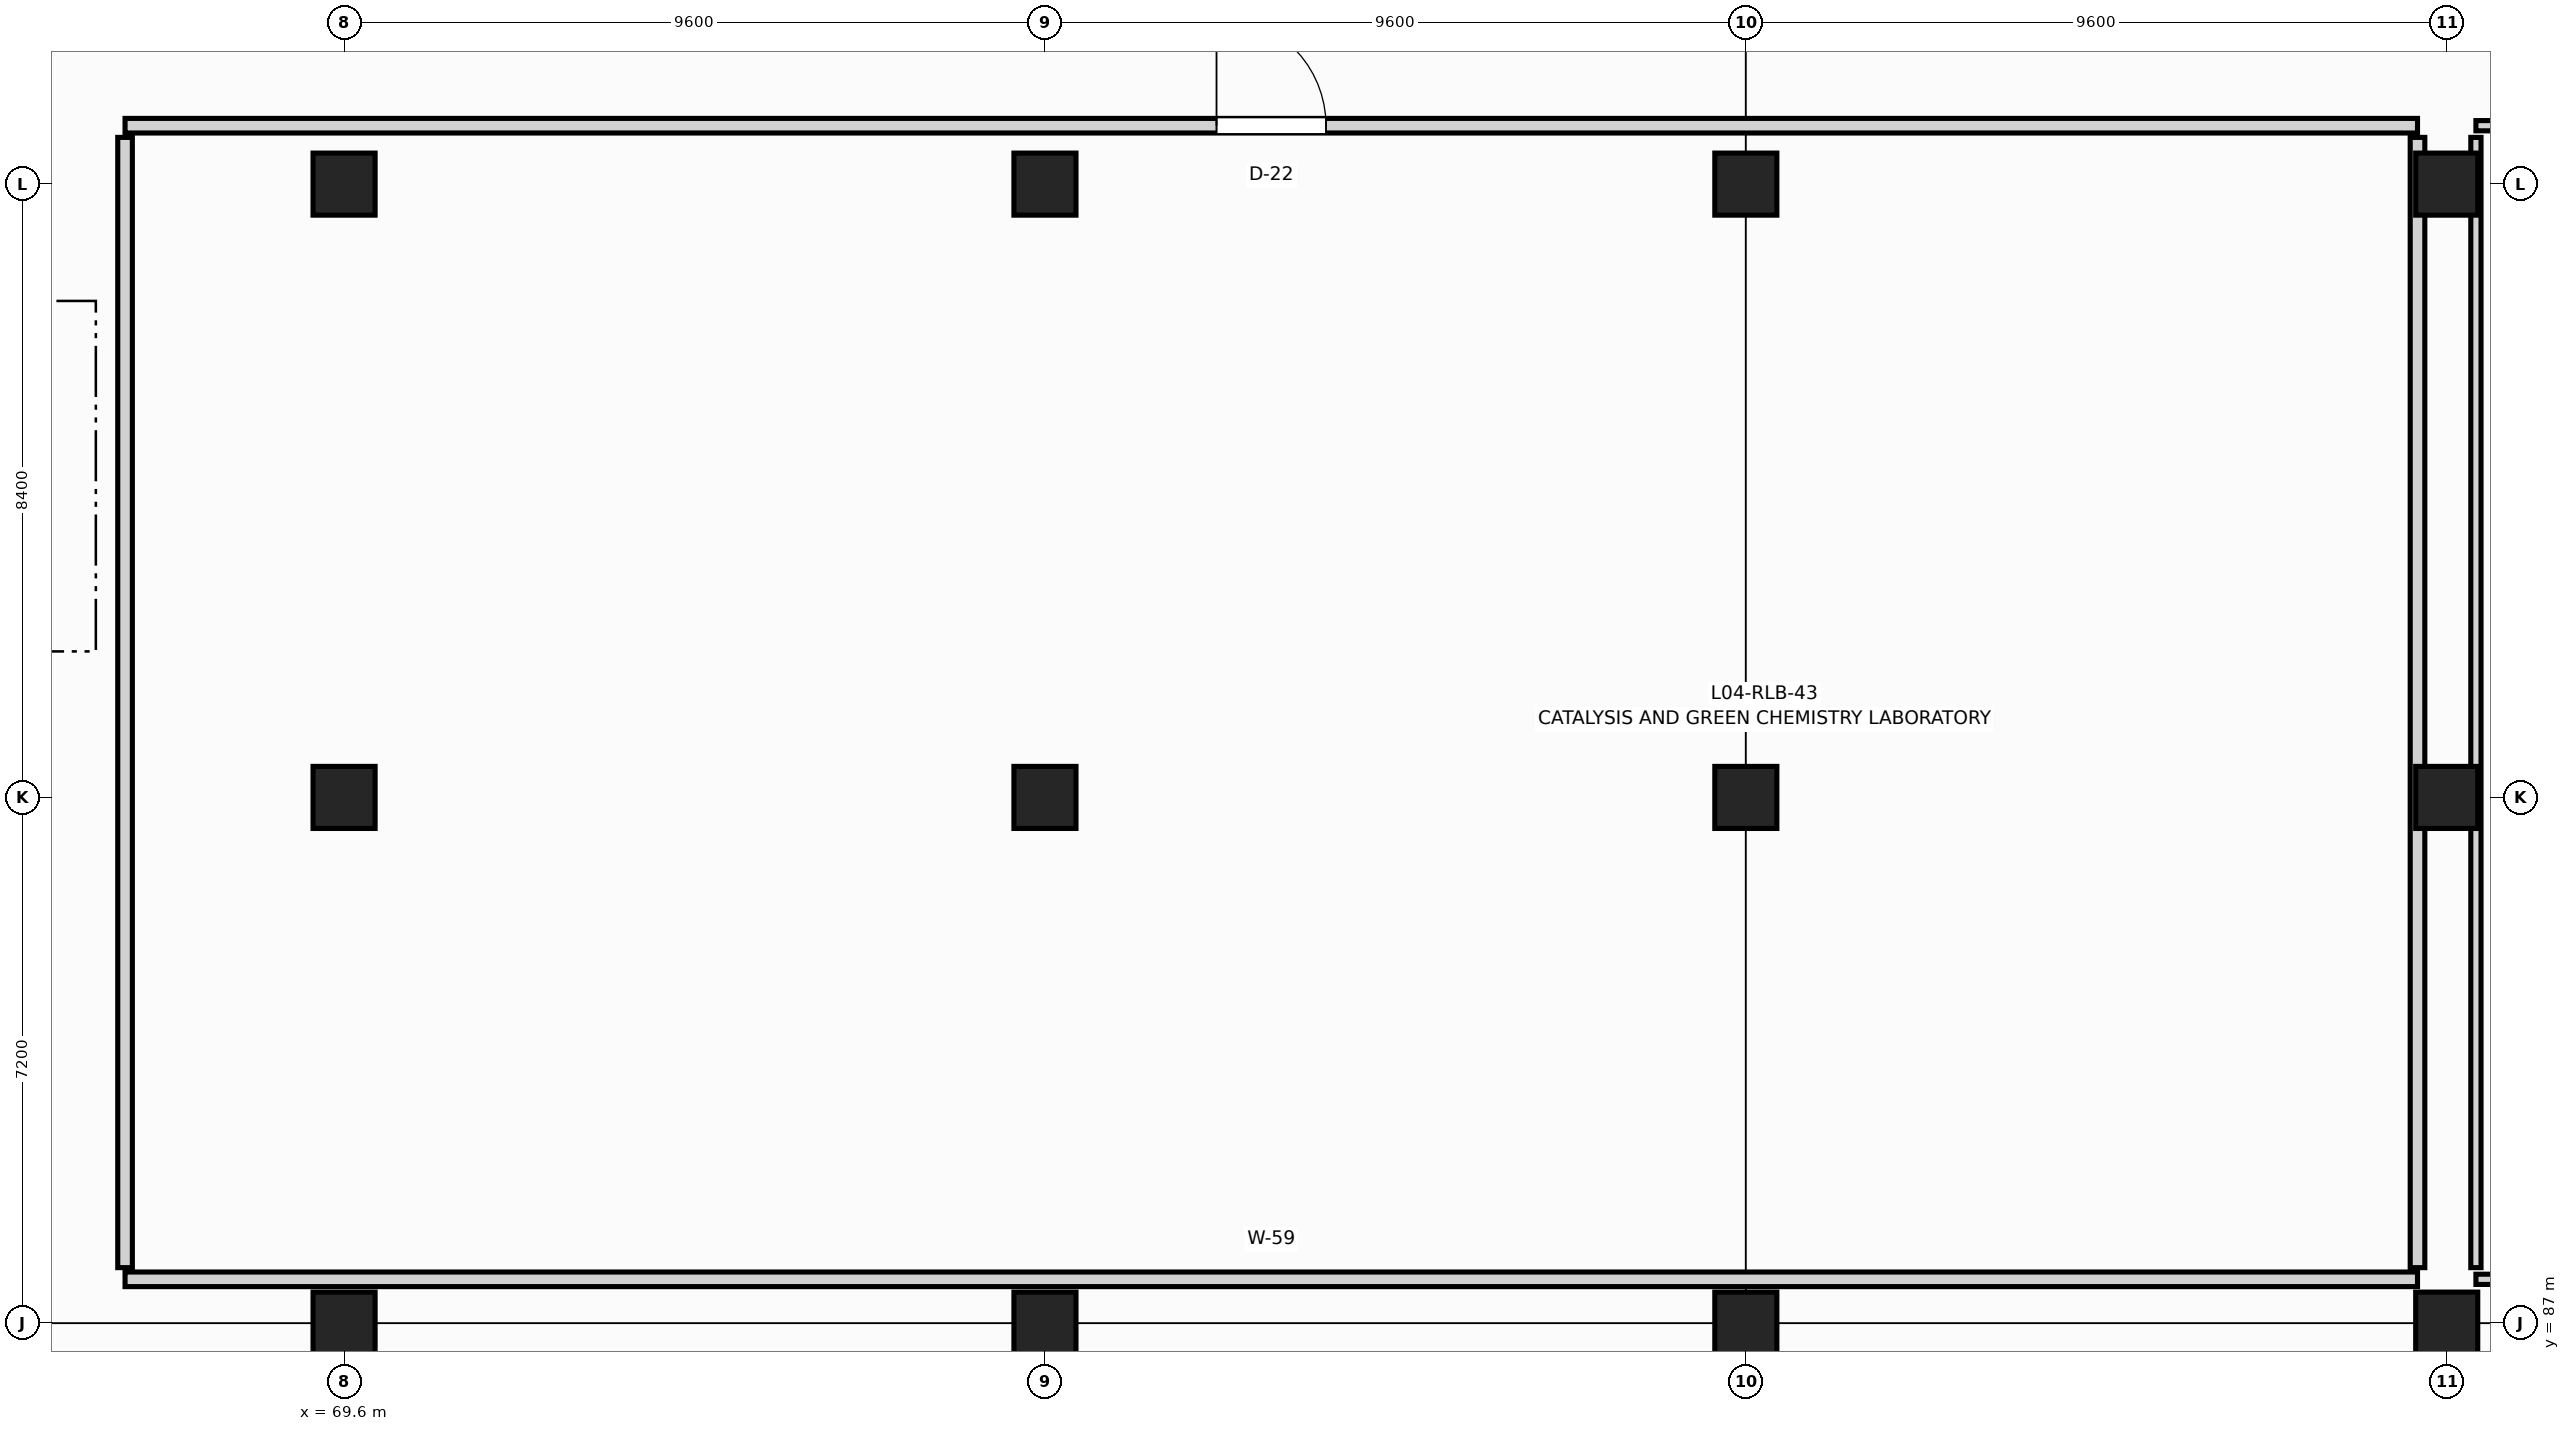
"""IFC4 building model, lengths in metres.
Left out: names, types, materials, properties, quantities, classifications, styles, units other than length and angle.
Written with IfcOpenShell. Run it as: python <this file> out.ifc"""

import sys

from ifc_helpers import new_model, si_unit, direction, frame, frame_2d, origin, origin_2d, place, context, subcontext, project, spatial, rectangle, extrude, element, fill, save


model = new_model("IFC4")
c1 = context("Model", 3, precision=1e-05, world=origin(), true_north=direction((0.0, 1.0)))
c2 = subcontext(c1, "Body", "Model", "MODEL_VIEW")
j1 = project(units=[si_unit("LENGTHUNIT", "METRE"), si_unit("PLANEANGLEUNIT", "RADIAN")], contexts=[c1])
p1 = place(None, origin())
s1 = spatial("IfcSite", under=j1, at=p1, CompositionType="ELEMENT")
p2 = place(p1, origin())
s2 = spatial("IfcBuilding", under=s1, at=p2, CompositionType="ELEMENT")
p3 = place(p2, frame((0.0, 0.0, 18.3)))
s3 = spatial("IfcBuildingStorey", under=s2, at=p3, CompositionType="ELEMENT", Elevation=18.3)
for number, where, z_axis, x_axis in (
    (1, (69.6, 87.0, 0.0), (0.0, 0.0, 1.0), (1.0, 0.0, 0.0)),
    (2, (69.6, 94.2, 0.0), (0.0, 0.0, 1.0), (1.0, 0.0, 0.0)),
    (3, (69.6, 102.6, 0.0), (0.0, 0.0, 1.0), (1.0, 0.0, 0.0)),
    (4, (79.2, 87.0, 0.0), (0.0, 0.0, 1.0), (1.0, 0.0, 0.0)),
    (5, (79.2, 94.2, 0.0), (0.0, 0.0, 1.0), (1.0, 0.0, 0.0)),
    (6, (79.2, 102.6, 0.0), (0.0, 0.0, 1.0), (1.0, 0.0, 0.0)),
    (7, (88.8, 87.0, 0.0), (0.0, 0.0, 1.0), (1.0, 0.0, 0.0)),
    (8, (88.8, 94.2, 0.0), (0.0, 0.0, 1.0), (1.0, 0.0, 0.0)),
    (9, (88.8, 102.6, 0.0), (0.0, 0.0, 1.0), (1.0, 0.0, 0.0)),
    (10, (98.4, 87.0, 0.0), (0.0, 0.0, 1.0), (1.0, 0.0, 0.0)),
    (11, (98.4, 94.2, 0.0), (0.0, 0.0, 1.0), (1.0, 0.0, 0.0)),
    (12, (98.4, 102.6, 0.0), (0.0, 0.0, 1.0), (1.0, 0.0, 0.0)),
):
    element("IfcColumn", number, at=place(p3, frame(where, z_axis=z_axis, x_axis=x_axis)), inside=s3, PredefinedType="COLUMN", context=c2, shape_type="SweptSolid", body=[
        extrude(rectangle(XDim=0.85, YDim=0.85, at=origin_2d()), origin(), (0.0, 0.0, 1.0), 3.9),
    ])
p4 = place(p3, frame((66.6, 87.6, 0.0), z_axis=(0.0, 0.0, 1.0), x_axis=(1.0, 0.0, 0.0)))
e13 = element("IfcWall", 13, at=p4, inside=s3, PredefinedType="PARTITIONING", context=c2, shape_type="SweptSolid", body=[
    extrude(rectangle(XDim=31.4, YDim=0.2, at=frame_2d((15.7, 0.0))), origin(), (0.0, 0.0, 1.0), 3.15),
])
p5 = place(p3, frame((66.6, 103.4, 0.0), z_axis=(0.0, 0.0, 1.0), x_axis=(1.0, 0.0, 0.0)))
e14 = element("IfcWall", 14, at=p5, inside=s3, PredefinedType="PARTITIONING", context=c2, shape_type="SweptSolid", body=[
    extrude(rectangle(XDim=31.4, YDim=0.2, at=frame_2d((15.7, 0.0))), origin(), (0.0, 0.0, 1.0), 3.15),
])
p6 = place(p5, frame((14.95, 0.0, 0.0)))
e15 = element("IfcOpeningElement", 15, at=p6, cuts=e14, PredefinedType="OPENING", context=c2, shape_type="SweptSolid", body=[
    extrude(rectangle(XDim=1.5, YDim=2.2, at=frame_2d((0.75, 1.1))), frame((0.0, 0.11, 0.0), z_axis=(0.0, -1.0, 0.0), x_axis=(1.0, 0.0, 0.0)), (0.0, 0.0, 1.0), 0.22),
])
for number, where, z_axis, x_axis in (
    (16, (66.6, 87.76, 0.0), (0.0, 0.0, 1.0), (0.0, 1.0, 0.0)),
    (17, (98.0, 87.76, 0.0), (0.0, 0.0, 1.0), (0.0, 1.0, 0.0)),
):
    element("IfcWall", number, at=place(p3, frame(where, z_axis=z_axis, x_axis=x_axis)), inside=s3, PredefinedType="PARTITIONING", context=c2, shape_type="SweptSolid", body=[
        extrude(rectangle(XDim=15.48, YDim=0.2, at=frame_2d((7.74, 0.0))), origin(), (0.0, 0.0, 1.0), 3.15),
    ])
p7 = place(p3, frame((98.8, 87.6, 0.0), z_axis=(0.0, 0.0, 1.0), x_axis=(1.0, 0.0, 0.0)))
e18 = element("IfcWall", 18, at=p7, inside=s3, PredefinedType="PARTITIONING", context=c2, shape_type="SweptSolid", body=[
    extrude(rectangle(XDim=18.0, YDim=0.14, at=frame_2d((9.0, 0.0))), origin(), (0.0, 0.0, 1.0), 3.15),
])
p8 = place(p3, frame((98.8, 103.4, 0.0), z_axis=(0.0, 0.0, 1.0), x_axis=(1.0, 0.0, 0.0)))
e19 = element("IfcWall", 19, at=p8, inside=s3, PredefinedType="PARTITIONING", context=c2, shape_type="SweptSolid", body=[
    extrude(rectangle(XDim=18.0, YDim=0.14, at=frame_2d((9.0, 0.0))), origin(), (0.0, 0.0, 1.0), 3.15),
])
p9 = place(p8, frame((5.79, 0.0, 0.0)))
e20 = element("IfcOpeningElement", 20, at=p9, cuts=e19, PredefinedType="OPENING", context=c2, shape_type="SweptSolid", body=[
    extrude(rectangle(XDim=1.02, YDim=2.2, at=frame_2d((0.51, 1.1))), frame((0.0, 0.08, 0.0), z_axis=(0.0, -1.0, 0.0), x_axis=(1.0, 0.0, 0.0)), (0.0, 0.0, 1.0), 0.16),
])
p10 = place(p3, frame((98.8, 87.76, 0.0), z_axis=(0.0, 0.0, 1.0), x_axis=(0.0, 1.0, 0.0)))
e21 = element("IfcWall", 21, at=p10, inside=s3, PredefinedType="PARTITIONING", context=c2, shape_type="SweptSolid", body=[
    extrude(rectangle(XDim=15.48, YDim=0.14, at=frame_2d((7.74, 0.0))), origin(), (0.0, 0.0, 1.0), 3.15),
])
p11 = place(p6, origin())
e22 = element("IfcDoor", 22, at=p11, inside=s3, OperationType="SINGLE_SWING_LEFT", PredefinedType="DOOR", context=c2, shape_type="SweptSolid", body=[
    extrude(rectangle(XDim=1.5, YDim=2.2, at=frame_2d((0.75, 1.1))), frame((0.0, 0.025, 0.0), z_axis=(0.0, -1.0, 0.0), x_axis=(1.0, 0.0, 0.0)), (0.0, 0.0, 1.0), 0.05),
])
fill(e15, e22)
save(model, sys.argv[1])
